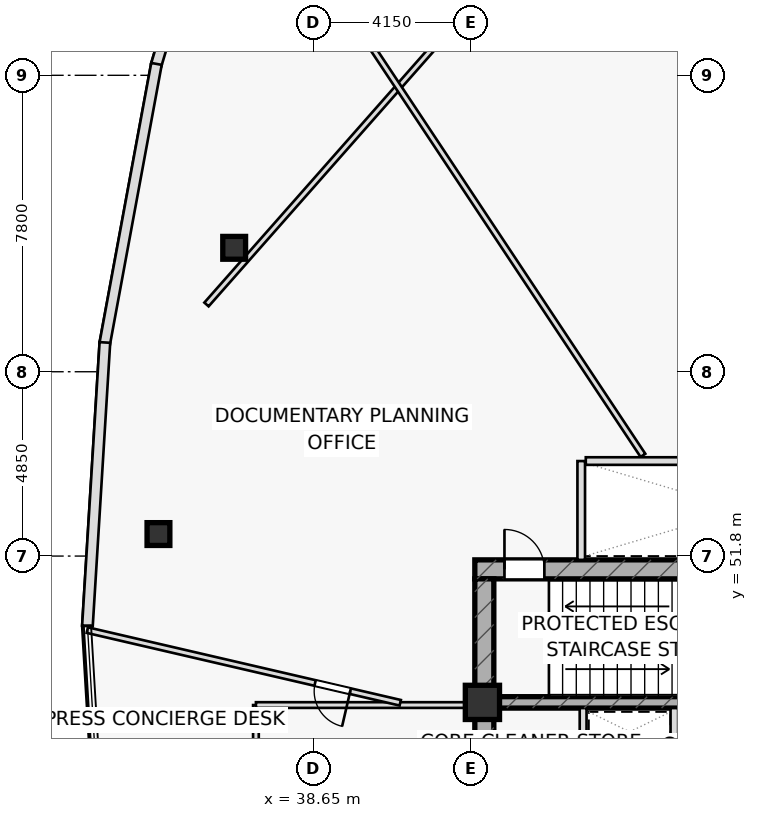
"""IFC4 building model, lengths in metres.
Left out: names, types, materials, properties, quantities, classifications, styles, units other than length and angle.
Written with IfcOpenShell. Run it as: python <this file> out.ifc"""

import sys

from ifc_helpers import new_model, si_unit, direction, frame, frame_2d, origin, origin_2d, place, context, subcontext, project, spatial, rectangle, hollow_rectangle, extrude, element, fill, save


model = new_model("IFC4")
c1 = context("Model", 3, precision=1e-05, world=origin(), true_north=direction((0.0, 1.0)))
c2 = subcontext(c1, "Body", "Model", "MODEL_VIEW")
j1 = project(units=[si_unit("LENGTHUNIT", "METRE"), si_unit("PLANEANGLEUNIT", "RADIAN")], contexts=[c1])
p1 = place(None, origin())
s1 = spatial("IfcSite", under=j1, at=p1, CompositionType="ELEMENT")
p2 = place(p1, origin())
s2 = spatial("IfcBuilding", under=s1, at=p2, CompositionType="ELEMENT")
p3 = place(p2, frame((0.0, 0.0, 188.75)))
s3 = spatial("IfcBuildingStorey", under=s2, at=p3, CompositionType="ELEMENT", Elevation=188.75)
p4 = place(p3, frame((42.9, 51.45, 0.0), z_axis=(0.0, 0.0, 1.0), x_axis=(1.0, 0.0, 0.0)))
e1 = element("IfcWall", 1, at=p4, inside=s3, PredefinedType="SHEAR", context=c2, shape_type="SweptSolid", body=[
    extrude(rectangle(XDim=14.2, YDim=0.5, at=frame_2d((7.1, 0.0))), origin(), (0.0, 0.0, 1.0), 3.55),
])
p5 = place(p4, frame((0.78, 0.0, 0.0)))
e2 = element("IfcOpeningElement", 2, at=p5, cuts=e1, PredefinedType="OPENING", context=c2, shape_type="SweptSolid", body=[
    extrude(rectangle(XDim=1.05, YDim=2.2, at=frame_2d((0.525, 1.1))), frame((0.0, 0.26, 0.0), z_axis=(0.0, -1.0, 0.0), x_axis=(1.0, 0.0, 0.0)), (0.0, 0.0, 1.0), 0.52),
])
p6 = place(p3, frame((43.15, 38.8, 0.0), z_axis=(0.0, 0.0, 1.0), x_axis=(0.0, 1.0, 0.0)))
e3 = element("IfcWall", 3, at=p6, inside=s3, PredefinedType="SHEAR", context=c2, shape_type="SweptSolid", body=[
    extrude(rectangle(XDim=12.4, YDim=0.5, at=frame_2d((6.2, 0.0))), origin(), (0.0, 0.0, 1.0), 3.55),
])
p7 = place(p3, frame((43.4, 47.95, 0.0), z_axis=(0.0, 0.0, 1.0), x_axis=(1.0, 0.0, 0.0)))
e4 = element("IfcWall", 4, at=p7, inside=s3, PredefinedType="SHEAR", context=c2, shape_type="SweptSolid", body=[
    extrude(rectangle(XDim=13.2, YDim=0.3, at=frame_2d((6.6, 0.0))), origin(), (0.0, 0.0, 1.0), 3.55),
])
p8 = place(p7, frame((8.345, 0.0, 0.0)))
e5 = element("IfcOpeningElement", 5, at=p8, cuts=e4, PredefinedType="OPENING", context=c2, shape_type="SweptSolid", body=[
    extrude(rectangle(XDim=1.15, YDim=2.2, at=frame_2d((0.575, 1.1))), frame((0.0, 0.16, 0.0), z_axis=(0.0, -1.0, 0.0), x_axis=(1.0, 0.0, 0.0)), (0.0, 0.0, 1.0), 0.32),
])
p9 = place(p7, frame((10.065, 0.0, 0.0)))
e6 = element("IfcOpeningElement", 6, at=p9, cuts=e4, PredefinedType="OPENING", context=c2, shape_type="SweptSolid", body=[
    extrude(rectangle(XDim=1.15, YDim=2.2, at=frame_2d((0.575, 1.1))), frame((0.0, 0.16, 0.0), z_axis=(0.0, -1.0, 0.0), x_axis=(1.0, 0.0, 0.0)), (0.0, 0.0, 1.0), 0.32),
])
p10 = place(p7, frame((11.645, 0.0, 0.0)))
e7 = element("IfcOpeningElement", 7, at=p10, cuts=e4, PredefinedType="OPENING", context=c2, shape_type="SweptSolid", body=[
    extrude(rectangle(XDim=1.15, YDim=2.2, at=frame_2d((0.575, 1.1))), frame((0.0, 0.16, 0.0), z_axis=(0.0, -1.0, 0.0), x_axis=(1.0, 0.0, 0.0)), (0.0, 0.0, 1.0), 0.32),
])
p11 = place(p3, frame((43.1, 47.95, 0.0), z_axis=(0.0, 0.0, 1.0), x_axis=(1.0, 0.0, 0.0)))
e8 = element("IfcColumn", 8, at=p11, inside=s3, PredefinedType="COLUMN", context=c2, shape_type="SweptSolid", body=[
    extrude(rectangle(XDim=0.9, YDim=0.9, at=origin_2d()), origin(), (0.0, 0.0, 1.0), 3.55),
])
for number, where, z_axis, x_axis in (
    (9, (36.568, 59.911, 0.0), (0.0, 0.0, 1.0), (1.0, 0.0, 0.0)),
    (10, (34.575, 52.379, 0.0), (0.0, 0.0, 1.0), (1.0, 0.0, 0.0)),
):
    element("IfcColumn", number, at=place(p3, frame(where, z_axis=z_axis, x_axis=x_axis)), inside=s3, PredefinedType="COLUMN", context=c2, shape_type="SweptSolid", body=[
        extrude(hollow_rectangle(XDim=0.6, YDim=0.6, WallThickness=0.036, at=origin_2d()), origin(), (0.0, 0.0, 1.0), 3.55),
    ])
p12 = place(p3, frame((45.7, 51.7, 0.0), z_axis=(0.0, 0.0, 1.0), x_axis=(0.0, 1.0, 0.0)))
e11 = element("IfcWall", 11, at=p12, inside=s3, PredefinedType="PARTITIONING", context=c2, shape_type="SweptSolid", body=[
    extrude(rectangle(XDim=2.6, YDim=0.2, at=frame_2d((1.3, 0.0))), origin(), (0.0, 0.0, 1.0), 3.55),
])
p13 = place(p3, frame((48.15, 46.55, 0.0), z_axis=(0.0, 0.0, 1.0), x_axis=(0.0, 1.0, 0.0)))
e12 = element("IfcWall", 12, at=p13, inside=s3, PredefinedType="PARTITIONING", context=c2, shape_type="SweptSolid", body=[
    extrude(rectangle(XDim=1.25, YDim=0.2, at=frame_2d((0.625, 0.0))), origin(), (0.0, 0.0, 1.0), 3.55),
])
p14 = place(p3, frame((45.75, 42.2, 0.0), z_axis=(0.0, 0.0, 1.0), x_axis=(0.0, 1.0, 0.0)))
e13 = element("IfcWall", 13, at=p14, inside=s3, PredefinedType="PARTITIONING", context=c2, shape_type="SweptSolid", body=[
    extrude(rectangle(XDim=5.6, YDim=0.18, at=frame_2d((2.8, 0.0))), origin(), (0.0, 0.0, 1.0), 3.55),
])
p15 = place(p14, frame((0.55, 0.0, 0.0)))
e14 = element("IfcOpeningElement", 14, at=p15, cuts=e13, PredefinedType="OPENING", context=c2, shape_type="SweptSolid", body=[
    extrude(rectangle(XDim=0.9, YDim=2.05, at=frame_2d((0.45, 1.025))), frame((0.0, 0.1, 0.0), z_axis=(0.0, -1.0, 0.0), x_axis=(1.0, 0.0, 0.0)), (0.0, 0.0, 1.0), 0.2),
])
p16 = place(p14, frame((2.9, 0.0, 0.0)))
e15 = element("IfcOpeningElement", 15, at=p16, cuts=e13, PredefinedType="OPENING", context=c2, shape_type="SweptSolid", body=[
    extrude(rectangle(XDim=0.85, YDim=2.05, at=frame_2d((0.425, 1.025))), frame((0.0, 0.1, 0.0), z_axis=(0.0, -1.0, 0.0), x_axis=(1.0, 0.0, 0.0)), (0.0, 0.0, 1.0), 0.2),
])
p17 = place(p3, frame((43.4, 66.989, 0.0), z_axis=(0.0, 0.0, 1.0), x_axis=(-0.661622343701, -0.749837231881, 0.0)))
e16 = element("IfcWall", 16, at=p17, inside=s3, PredefinedType="PARTITIONING", context=c2, shape_type="SweptSolid", body=[
    extrude(rectangle(XDim=11.427, YDim=0.15, at=frame_2d((5.714, 0.0))), origin(), (0.0, 0.0, 1.0), 2.935),
])
p18 = place(p3, frame((37.14, 40.3, 0.0), z_axis=(0.0, 0.0, 1.0), x_axis=(0.0, 1.0, 0.0)))
e17 = element("IfcWall", 17, at=p18, inside=s3, PredefinedType="PARTITIONING", context=c2, shape_type="SweptSolid", body=[
    extrude(rectangle(XDim=7.58, YDim=0.15, at=frame_2d((3.79, 0.0))), origin(), (0.0, 0.0, 1.0), 2.935),
])
p19 = place(p3, frame((37.14, 47.88, 0.0), z_axis=(0.0, 0.0, 1.0), x_axis=(1.0, 0.0, 0.0)))
e18 = element("IfcWall", 18, at=p19, inside=s3, PredefinedType="PARTITIONING", context=c2, shape_type="SweptSolid", body=[
    extrude(rectangle(XDim=5.76, YDim=0.15, at=frame_2d((2.88, 0.0))), origin(), (0.0, 0.0, 1.0), 2.935),
])
p20 = place(p3, frame((47.324, 54.45, 0.0), z_axis=(0.0, 0.0, 1.0), x_axis=(-0.553223575902, 0.83303281752, 0.0)))
e19 = element("IfcWall", 19, at=p20, inside=s3, PredefinedType="PARTITIONING", context=c2, shape_type="SweptSolid", body=[
    extrude(rectangle(XDim=17.142, YDim=0.15, at=frame_2d((8.571, 0.0))), origin(), (0.0, 0.0, 1.0), 2.935),
])
p21 = place(p3, frame((40.937, 47.94, 0.0), z_axis=(0.0, 0.0, 1.0), x_axis=(-0.974086065595, 0.226177666479, 0.0)))
e20 = element("IfcWall", 20, at=p21, inside=s3, PredefinedType="PARTITIONING", context=c2, shape_type="SweptSolid", body=[
    extrude(rectangle(XDim=8.453, YDim=0.15, at=frame_2d((4.227, 0.0))), origin(), (0.0, 0.0, 1.0), 2.935),
])
p22 = place(p21, frame((1.35, 0.0, 0.0)))
e21 = element("IfcOpeningElement", 21, at=p22, cuts=e20, PredefinedType="OPENING", context=c2, shape_type="SweptSolid", body=[
    extrude(rectangle(XDim=0.95, YDim=2.05, at=frame_2d((0.475, 1.025))), frame((0.0, 0.085, 0.0), z_axis=(0.0, -1.0, 0.0), x_axis=(1.0, 0.0, 0.0)), (0.0, 0.0, 1.0), 0.17),
])
p23 = place(p3, frame((35.076, 66.594, 0.0), z_axis=(0.0, 0.0, 1.0), x_axis=(-0.286511316859, -0.958076857727, 0.0)))
e22 = element("IfcWall", 22, at=p23, inside=s3, PredefinedType="STANDARD", context=c2, shape_type="SweptSolid", body=[
    extrude(rectangle(XDim=1.955, YDim=0.28, at=frame_2d((0.978, 0.0))), origin(), (0.0, 0.0, 1.0), 3.55),
])
p24 = place(p3, frame((34.523, 64.75, 0.0), z_axis=(0.0, 0.0, 1.0), x_axis=(-0.181818264713, -0.983332150708, 0.0)))
e23 = element("IfcWall", 23, at=p24, inside=s3, PredefinedType="STANDARD", context=c2, shape_type="SweptSolid", body=[
    extrude(rectangle(XDim=7.485, YDim=0.28, at=frame_2d((3.742, 0.0))), origin(), (0.0, 0.0, 1.0), 3.55),
])
p25 = place(p3, frame((33.166, 57.42, 0.0), z_axis=(0.0, 0.0, 1.0), x_axis=(-0.061489369983, -0.998107738363, 0.0)))
e24 = element("IfcWall", 24, at=p25, inside=s3, PredefinedType="STANDARD", context=c2, shape_type="SweptSolid", body=[
    extrude(rectangle(XDim=7.472, YDim=0.28, at=frame_2d((3.736, 0.0))), origin(), (0.0, 0.0, 1.0), 3.55),
])
p26 = place(p3, frame((45.82, 54.3, 0.0), z_axis=(0.0, 0.0, 1.0), x_axis=(1.0, 0.0, 0.0)))
e25 = element("IfcWall", 25, at=p26, inside=s3, PredefinedType="PARTITIONING", context=c2, shape_type="SweptSolid", body=[
    extrude(rectangle(XDim=8.31, YDim=0.2, at=frame_2d((4.155, 0.0))), origin(), (0.0, 0.0, 1.0), 3.55),
])
p27 = place(p5, origin())
e26 = element("IfcDoor", 26, at=p27, inside=s3, OperationType="SINGLE_SWING_LEFT", PredefinedType="DOOR", context=c2, shape_type="SweptSolid", body=[
    extrude(rectangle(XDim=1.05, YDim=2.2, at=frame_2d((0.525, 1.1))), frame((0.0, 0.025, 0.0), z_axis=(0.0, -1.0, 0.0), x_axis=(1.0, 0.0, 0.0)), (0.0, 0.0, 1.0), 0.05),
])
fill(e2, e26)
p28 = place(p22, origin())
e27 = element("IfcDoor", 27, at=p28, inside=s3, OperationType="SINGLE_SWING_LEFT", PredefinedType="DOOR", context=c2, shape_type="SweptSolid", body=[
    extrude(rectangle(XDim=0.95, YDim=2.05, at=frame_2d((0.475, 1.025))), frame((0.0, 0.025, 0.0), z_axis=(0.0, -1.0, 0.0), x_axis=(1.0, 0.0, 0.0)), (0.0, 0.0, 1.0), 0.05),
])
fill(e21, e27)
save(model, sys.argv[1])
